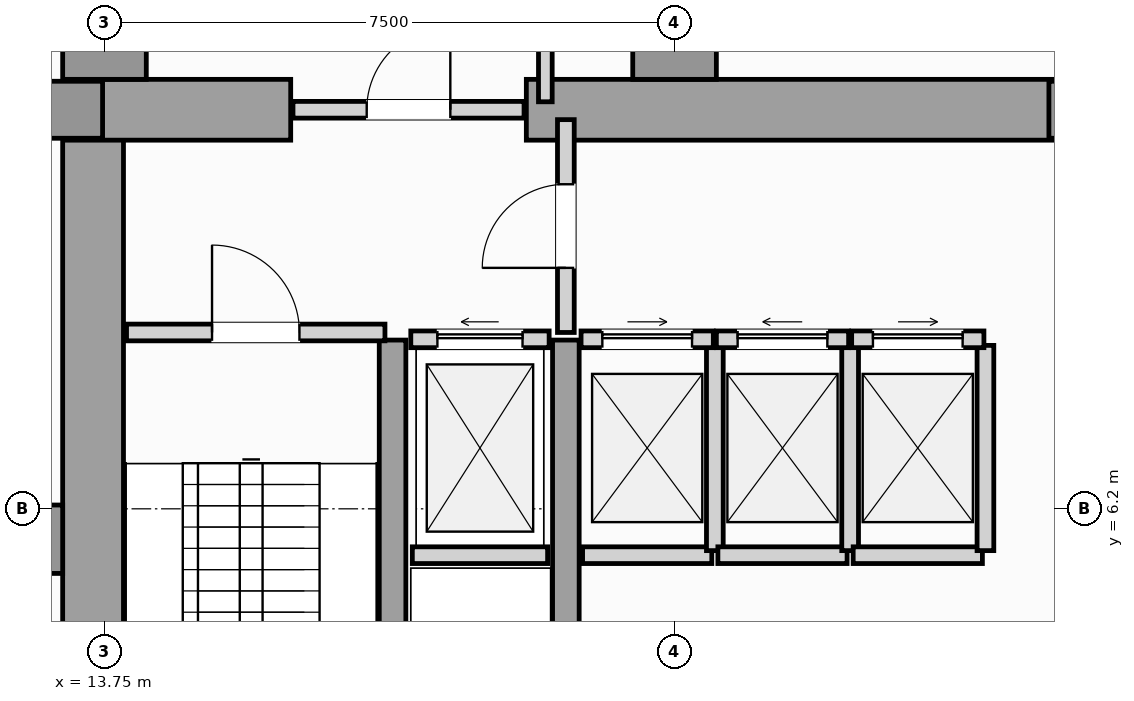
"""IFC4 building model, lengths in metres.
Left out: names, types, materials, properties, quantities, classifications, styles, units other than length and angle.
Written with IfcOpenShell. Run it as: python <this file> out.ifc"""

import sys

from ifc_helpers import new_model, si_unit, direction, frame, frame_2d, origin, origin_2d, place, context, subcontext, project, spatial, rectangle, extrude, element, fill, save


model = new_model("IFC4")
c1 = context("Model", 3, precision=1e-05, world=origin(), true_north=direction((0.0, 1.0)))
c2 = subcontext(c1, "Body", "Model", "MODEL_VIEW")
j1 = project(units=[si_unit("LENGTHUNIT", "METRE"), si_unit("PLANEANGLEUNIT", "RADIAN")], contexts=[c1])
p1 = place(None, origin())
s1 = spatial("IfcSite", under=j1, at=p1, CompositionType="ELEMENT")
p2 = place(p1, origin())
s2 = spatial("IfcBuilding", under=s1, at=p2, CompositionType="ELEMENT")
p3 = place(p2, origin())
s3 = spatial("IfcBuildingStorey", under=s2, at=p3, CompositionType="ELEMENT", Elevation=0.0)
p4 = place(p3, frame((13.6, 0.92, 0.0), z_axis=(0.0, 0.0, 1.0), x_axis=(0.0, 1.0, 0.0)))
e1 = element("IfcWall", 1, at=p4, inside=s3, PredefinedType="SHEAR", context=c2, shape_type="SweptSolid", body=[
    extrude(rectangle(XDim=10.53, YDim=0.8, at=frame_2d((5.265, 0.0))), origin(), (0.0, 0.0, 1.0), 5.1),
])
p5 = place(p3, frame((13.25, 11.45, 0.0), z_axis=(0.0, 0.0, 1.0), x_axis=(1.0, 0.0, 0.0)))
e2 = element("IfcWall", 2, at=p5, inside=s3, PredefinedType="SHEAR", context=c2, shape_type="SweptSolid", body=[
    extrude(rectangle(XDim=2.95, YDim=0.8, at=frame_2d((1.475, 0.0))), origin(), (0.0, 0.0, 1.0), 5.1),
])
p6 = place(p3, frame((19.3, 11.45, 0.0), z_axis=(0.0, 0.0, 1.0), x_axis=(1.0, 0.0, 0.0)))
e3 = element("IfcWall", 3, at=p6, inside=s3, PredefinedType="SHEAR", context=c2, shape_type="SweptSolid", body=[
    extrude(rectangle(XDim=7.3, YDim=0.8, at=frame_2d((3.65, 0.0))), origin(), (0.0, 0.0, 1.0), 5.1),
])
for number, where, z_axis, x_axis in (
    (4, (17.54, 0.92, 0.0), (0.0, 0.0, 1.0), (0.0, 1.0, 0.0)),
    (5, (19.82, 0.92, 0.0), (0.0, 0.0, 1.0), (0.0, 1.0, 0.0)),
):
    element("IfcWall", number, at=place(p3, frame(where, z_axis=z_axis, x_axis=x_axis)), inside=s3, PredefinedType="SHEAR", context=c2, shape_type="SweptSolid", body=[
        extrude(rectangle(XDim=7.5, YDim=0.35, at=frame_2d((3.75, 0.0))), origin(), (0.0, 0.0, 1.0), 5.1),
    ])
p7 = place(p3, frame((12.9, 5.8, 0.0), z_axis=(0.0, 0.0, 1.0), x_axis=(1.0, 0.0, 0.0)))
e6 = element("IfcColumn", 6, at=p7, inside=s3, PredefinedType="PILASTER", context=c2, shape_type="SweptSolid", body=[
    extrude(rectangle(XDim=0.6, YDim=0.9, at=origin_2d()), origin(), (0.0, 0.0, 1.0), 5.4),
])
for number, where, z_axis, x_axis in (
    (7, (13.35, 11.45, 0.0), (0.0, 0.0, 1.0), (1.0, 0.0, 0.0)),
    (8, (26.55, 11.45, 0.0), (0.0, 0.0, 1.0), (1.0, 0.0, 0.0)),
):
    element("IfcColumn", number, at=place(p3, frame(where, z_axis=z_axis, x_axis=x_axis)), inside=s3, PredefinedType="COLUMN", context=c2, shape_type="SweptSolid", body=[
        extrude(rectangle(XDim=0.75, YDim=0.75, at=origin_2d()), origin(), (0.0, 0.0, 1.0), 5.4),
    ])
for number, where, z_axis, x_axis in (
    (9, (13.75, 12.4, 0.0), (0.0, 0.0, 1.0), (1.0, 0.0, 0.0)),
    (10, (21.25, 12.4, 0.0), (0.0, 0.0, 1.0), (1.0, 0.0, 0.0)),
):
    element("IfcColumn", number, at=place(p3, frame(where, z_axis=z_axis, x_axis=x_axis)), inside=s3, PredefinedType="COLUMN", context=c2, shape_type="SweptSolid", body=[
        extrude(rectangle(XDim=1.1, YDim=1.1, at=origin_2d()), origin(), (0.0, 0.0, 1.0), 5.4),
    ])
p8 = place(p3, frame((17.8, 5.59, 0.0), z_axis=(0.0, 0.0, 1.0), x_axis=(1.0, 0.0, 0.0)))
e11 = element("IfcWall", 11, at=p8, inside=s3, PredefinedType="SOLIDWALL", context=c2, shape_type="SweptSolid", body=[
    extrude(rectangle(XDim=1.78, YDim=0.22, at=frame_2d((0.89, 0.0))), origin(), (0.0, 0.0, 1.0), 5.1),
])
p9 = place(p3, frame((17.78, 8.43, 0.0), z_axis=(0.0, 0.0, 1.0), x_axis=(1.0, 0.0, 0.0)))
e12 = element("IfcWall", 12, at=p9, inside=s3, PredefinedType="SOLIDWALL", context=c2, shape_type="SweptSolid", body=[
    extrude(rectangle(XDim=1.82, YDim=0.22, at=frame_2d((0.91, 0.0))), origin(), (0.0, 0.0, 1.0), 5.1),
])
p10 = place(p9, frame((0.35, 0.0, 0.0)))
e13 = element("IfcOpeningElement", 13, at=p10, cuts=e12, PredefinedType="OPENING", context=c2, shape_type="SweptSolid", body=[
    extrude(rectangle(XDim=1.12, YDim=2.25, at=frame_2d((0.56, 1.125))), frame((0.0, 0.12, 0.0), z_axis=(0.0, -1.0, 0.0), x_axis=(1.0, 0.0, 0.0)), (0.0, 0.0, 1.0), 0.24),
])
p11 = place(p3, frame((20.04, 5.59, 0.0), z_axis=(0.0, 0.0, 1.0), x_axis=(1.0, 0.0, 0.0)))
e14 = element("IfcWall", 14, at=p11, inside=s3, PredefinedType="SOLIDWALL", context=c2, shape_type="SweptSolid", body=[
    extrude(rectangle(XDim=1.7, YDim=0.22, at=frame_2d((0.85, 0.0))), origin(), (0.0, 0.0, 1.0), 5.1),
])
p12 = place(p3, frame((21.78, 5.65, 0.0), z_axis=(0.0, 0.0, 1.0), x_axis=(0.0, 1.0, 0.0)))
e15 = element("IfcWall", 15, at=p12, inside=s3, PredefinedType="SOLIDWALL", context=c2, shape_type="SweptSolid", body=[
    extrude(rectangle(XDim=2.7, YDim=0.22, at=frame_2d((1.35, 0.0))), origin(), (0.0, 0.0, 1.0), 5.1),
])
p13 = place(p3, frame((20.02, 8.43, 0.0), z_axis=(0.0, 0.0, 1.0), x_axis=(1.0, 0.0, 0.0)))
e16 = element("IfcWall", 16, at=p13, inside=s3, PredefinedType="SOLIDWALL", context=c2, shape_type="SweptSolid", body=[
    extrude(rectangle(XDim=1.74, YDim=0.22, at=frame_2d((0.87, 0.0))), origin(), (0.0, 0.0, 1.0), 5.1),
])
p14 = place(p13, frame((0.28, 0.0, 0.0)))
e17 = element("IfcOpeningElement", 17, at=p14, cuts=e16, PredefinedType="OPENING", context=c2, shape_type="SweptSolid", body=[
    extrude(rectangle(XDim=1.18, YDim=2.2, at=frame_2d((0.59, 1.1))), frame((0.0, 0.12, 0.0), z_axis=(0.0, -1.0, 0.0), x_axis=(1.0, 0.0, 0.0)), (0.0, 0.0, 1.0), 0.24),
])
p15 = place(p3, frame((21.82, 5.59, 0.0), z_axis=(0.0, 0.0, 1.0), x_axis=(1.0, 0.0, 0.0)))
e18 = element("IfcWall", 18, at=p15, inside=s3, PredefinedType="SOLIDWALL", context=c2, shape_type="SweptSolid", body=[
    extrude(rectangle(XDim=1.7, YDim=0.22, at=frame_2d((0.85, 0.0))), origin(), (0.0, 0.0, 1.0), 5.1),
])
p16 = place(p3, frame((23.56, 5.65, 0.0), z_axis=(0.0, 0.0, 1.0), x_axis=(0.0, 1.0, 0.0)))
e19 = element("IfcWall", 19, at=p16, inside=s3, PredefinedType="SOLIDWALL", context=c2, shape_type="SweptSolid", body=[
    extrude(rectangle(XDim=2.7, YDim=0.22, at=frame_2d((1.35, 0.0))), origin(), (0.0, 0.0, 1.0), 5.1),
])
p17 = place(p3, frame((21.8, 8.43, 0.0), z_axis=(0.0, 0.0, 1.0), x_axis=(1.0, 0.0, 0.0)))
e20 = element("IfcWall", 20, at=p17, inside=s3, PredefinedType="SOLIDWALL", context=c2, shape_type="SweptSolid", body=[
    extrude(rectangle(XDim=1.74, YDim=0.22, at=frame_2d((0.87, 0.0))), origin(), (0.0, 0.0, 1.0), 5.1),
])
p18 = place(p17, frame((0.28, 0.0, 0.0)))
e21 = element("IfcOpeningElement", 21, at=p18, cuts=e20, PredefinedType="OPENING", context=c2, shape_type="SweptSolid", body=[
    extrude(rectangle(XDim=1.18, YDim=2.2, at=frame_2d((0.59, 1.1))), frame((0.0, 0.12, 0.0), z_axis=(0.0, -1.0, 0.0), x_axis=(1.0, 0.0, 0.0)), (0.0, 0.0, 1.0), 0.24),
])
p19 = place(p3, frame((23.6, 5.59, 0.0), z_axis=(0.0, 0.0, 1.0), x_axis=(1.0, 0.0, 0.0)))
e22 = element("IfcWall", 22, at=p19, inside=s3, PredefinedType="SOLIDWALL", context=c2, shape_type="SweptSolid", body=[
    extrude(rectangle(XDim=1.7, YDim=0.22, at=frame_2d((0.85, 0.0))), origin(), (0.0, 0.0, 1.0), 5.1),
])
p20 = place(p3, frame((25.34, 5.65, 0.0), z_axis=(0.0, 0.0, 1.0), x_axis=(0.0, 1.0, 0.0)))
e23 = element("IfcWall", 23, at=p20, inside=s3, PredefinedType="SOLIDWALL", context=c2, shape_type="SweptSolid", body=[
    extrude(rectangle(XDim=2.7, YDim=0.22, at=frame_2d((1.35, 0.0))), origin(), (0.0, 0.0, 1.0), 5.1),
])
p21 = place(p3, frame((23.58, 8.43, 0.0), z_axis=(0.0, 0.0, 1.0), x_axis=(1.0, 0.0, 0.0)))
e24 = element("IfcWall", 24, at=p21, inside=s3, PredefinedType="SOLIDWALL", context=c2, shape_type="SweptSolid", body=[
    extrude(rectangle(XDim=1.74, YDim=0.22, at=frame_2d((0.87, 0.0))), origin(), (0.0, 0.0, 1.0), 5.1),
])
p22 = place(p21, frame((0.28, 0.0, 0.0)))
e25 = element("IfcOpeningElement", 25, at=p22, cuts=e24, PredefinedType="OPENING", context=c2, shape_type="SweptSolid", body=[
    extrude(rectangle(XDim=1.18, YDim=2.2, at=frame_2d((0.59, 1.1))), frame((0.0, 0.12, 0.0), z_axis=(0.0, -1.0, 0.0), x_axis=(1.0, 0.0, 0.0)), (0.0, 0.0, 1.0), 0.24),
])
p23 = place(p3, frame((14.04, 8.52, 0.0), z_axis=(0.0, 0.0, 1.0), x_axis=(1.0, 0.0, 0.0)))
e26 = element("IfcWall", 26, at=p23, inside=s3, PredefinedType="SOLIDWALL", context=c2, shape_type="SweptSolid", body=[
    extrude(rectangle(XDim=3.4, YDim=0.22, at=frame_2d((1.7, 0.0))), origin(), (0.0, 0.0, 1.0), 5.1),
])
p24 = place(p23, frame((1.125, 0.0, 0.0)))
e27 = element("IfcOpeningElement", 27, at=p24, cuts=e26, PredefinedType="OPENING", context=c2, shape_type="SweptSolid", body=[
    extrude(rectangle(XDim=1.15, YDim=2.2, at=frame_2d((0.575, 1.1))), frame((0.0, 0.12, 0.0), z_axis=(0.0, -1.0, 0.0), x_axis=(1.0, 0.0, 0.0)), (0.0, 0.0, 1.0), 0.24),
])
p25 = place(p3, frame((19.82, 8.52, 0.0), z_axis=(0.0, 0.0, 1.0), x_axis=(0.0, 1.0, 0.0)))
e28 = element("IfcWall", 28, at=p25, inside=s3, PredefinedType="SOLIDWALL", context=c2, shape_type="SweptSolid", body=[
    extrude(rectangle(XDim=2.8, YDim=0.22, at=frame_2d((1.4, 0.0))), origin(), (0.0, 0.0, 1.0), 4.555),
])
p26 = place(p25, frame((0.85, 0.0, 0.0)))
e29 = element("IfcOpeningElement", 29, at=p26, cuts=e28, PredefinedType="OPENING", context=c2, shape_type="SweptSolid", body=[
    extrude(rectangle(XDim=1.1, YDim=2.2, at=frame_2d((0.55, 1.1))), frame((0.0, 0.12, 0.0), z_axis=(0.0, -1.0, 0.0), x_axis=(1.0, 0.0, 0.0)), (0.0, 0.0, 1.0), 0.24),
])
p27 = place(p3, frame((16.23, 11.45, 0.0), z_axis=(0.0, 0.0, 1.0), x_axis=(1.0, 0.0, 0.0)))
e30 = element("IfcWall", 30, at=p27, inside=s3, PredefinedType="SOLIDWALL", context=c2, shape_type="SweptSolid", body=[
    extrude(rectangle(XDim=3.04, YDim=0.22, at=frame_2d((1.52, 0.0))), origin(), (0.0, 0.0, 1.0), 5.1),
])
p28 = place(p27, frame((0.97, 0.0, 0.0)))
e31 = element("IfcOpeningElement", 31, at=p28, cuts=e30, PredefinedType="OPENING", context=c2, shape_type="SweptSolid", body=[
    extrude(rectangle(XDim=1.1, YDim=2.2, at=frame_2d((0.55, 1.1))), frame((0.0, 0.12, 0.0), z_axis=(0.0, -1.0, 0.0), x_axis=(1.0, 0.0, 0.0)), (0.0, 0.0, 1.0), 0.24),
])
p29 = place(p3, frame((19.55, 11.555, 0.0), z_axis=(0.0, 0.0, 1.0), x_axis=(0.0, 1.0, 0.0)))
e32 = element("IfcWall", 32, at=p29, inside=s3, PredefinedType="PARTITIONING", context=c2, shape_type="SweptSolid", body=[
    extrude(rectangle(XDim=3.39, YDim=0.18, at=frame_2d((1.695, 0.0))), origin(), (0.0, 0.0, 1.0), 5.1),
])
p30 = place(p10, origin())
e33 = element("IfcDoor", 33, at=p30, inside=s3, OperationType="SLIDING_TO_LEFT", PredefinedType="DOOR", context=c2, shape_type="SweptSolid", body=[
    extrude(rectangle(XDim=1.12, YDim=2.25, at=frame_2d((0.56, 1.125))), frame((0.0, 0.025, 0.0), z_axis=(0.0, -1.0, 0.0), x_axis=(1.0, 0.0, 0.0)), (0.0, 0.0, 1.0), 0.05),
])
fill(e13, e33)
p31 = place(p14, origin())
e34 = element("IfcDoor", 34, at=p31, inside=s3, OperationType="SLIDING_TO_RIGHT", PredefinedType="DOOR", context=c2, shape_type="SweptSolid", body=[
    extrude(rectangle(XDim=1.18, YDim=2.2, at=frame_2d((0.59, 1.1))), frame((0.0, 0.025, 0.0), z_axis=(0.0, -1.0, 0.0), x_axis=(1.0, 0.0, 0.0)), (0.0, 0.0, 1.0), 0.05),
])
fill(e17, e34)
p32 = place(p18, origin())
e35 = element("IfcDoor", 35, at=p32, inside=s3, OperationType="SLIDING_TO_LEFT", PredefinedType="DOOR", context=c2, shape_type="SweptSolid", body=[
    extrude(rectangle(XDim=1.18, YDim=2.2, at=frame_2d((0.59, 1.1))), frame((0.0, 0.025, 0.0), z_axis=(0.0, -1.0, 0.0), x_axis=(1.0, 0.0, 0.0)), (0.0, 0.0, 1.0), 0.05),
])
fill(e21, e35)
p33 = place(p22, origin())
e36 = element("IfcDoor", 36, at=p33, inside=s3, OperationType="SLIDING_TO_RIGHT", PredefinedType="DOOR", context=c2, shape_type="SweptSolid", body=[
    extrude(rectangle(XDim=1.18, YDim=2.2, at=frame_2d((0.59, 1.1))), frame((0.0, 0.025, 0.0), z_axis=(0.0, -1.0, 0.0), x_axis=(1.0, 0.0, 0.0)), (0.0, 0.0, 1.0), 0.05),
])
fill(e25, e36)
p34 = place(p24, origin())
e37 = element("IfcDoor", 37, at=p34, inside=s3, OperationType="SINGLE_SWING_LEFT", PredefinedType="DOOR", context=c2, shape_type="SweptSolid", body=[
    extrude(rectangle(XDim=1.15, YDim=2.2, at=frame_2d((0.575, 1.1))), frame((0.0, 0.025, 0.0), z_axis=(0.0, -1.0, 0.0), x_axis=(1.0, 0.0, 0.0)), (0.0, 0.0, 1.0), 0.05),
])
fill(e27, e37)
p35 = place(p26, origin())
e38 = element("IfcDoor", 38, at=p35, inside=s3, OperationType="SINGLE_SWING_LEFT", PredefinedType="DOOR", context=c2, shape_type="SweptSolid", body=[
    extrude(rectangle(XDim=1.1, YDim=2.2, at=frame_2d((0.55, 1.1))), frame((0.0, 0.025, 0.0), z_axis=(0.0, -1.0, 0.0), x_axis=(1.0, 0.0, 0.0)), (0.0, 0.0, 1.0), 0.05),
])
fill(e29, e38)
p36 = place(p28, origin())
e39 = element("IfcDoor", 39, at=p36, inside=s3, OperationType="SINGLE_SWING_RIGHT", PredefinedType="DOOR", context=c2, shape_type="SweptSolid", body=[
    extrude(rectangle(XDim=1.1, YDim=2.2, at=frame_2d((0.55, 1.1))), frame((0.0, 0.025, 0.0), z_axis=(0.0, -1.0, 0.0), x_axis=(1.0, 0.0, 0.0)), (0.0, 0.0, 1.0), 0.05),
])
fill(e31, e39)
save(model, sys.argv[1])
